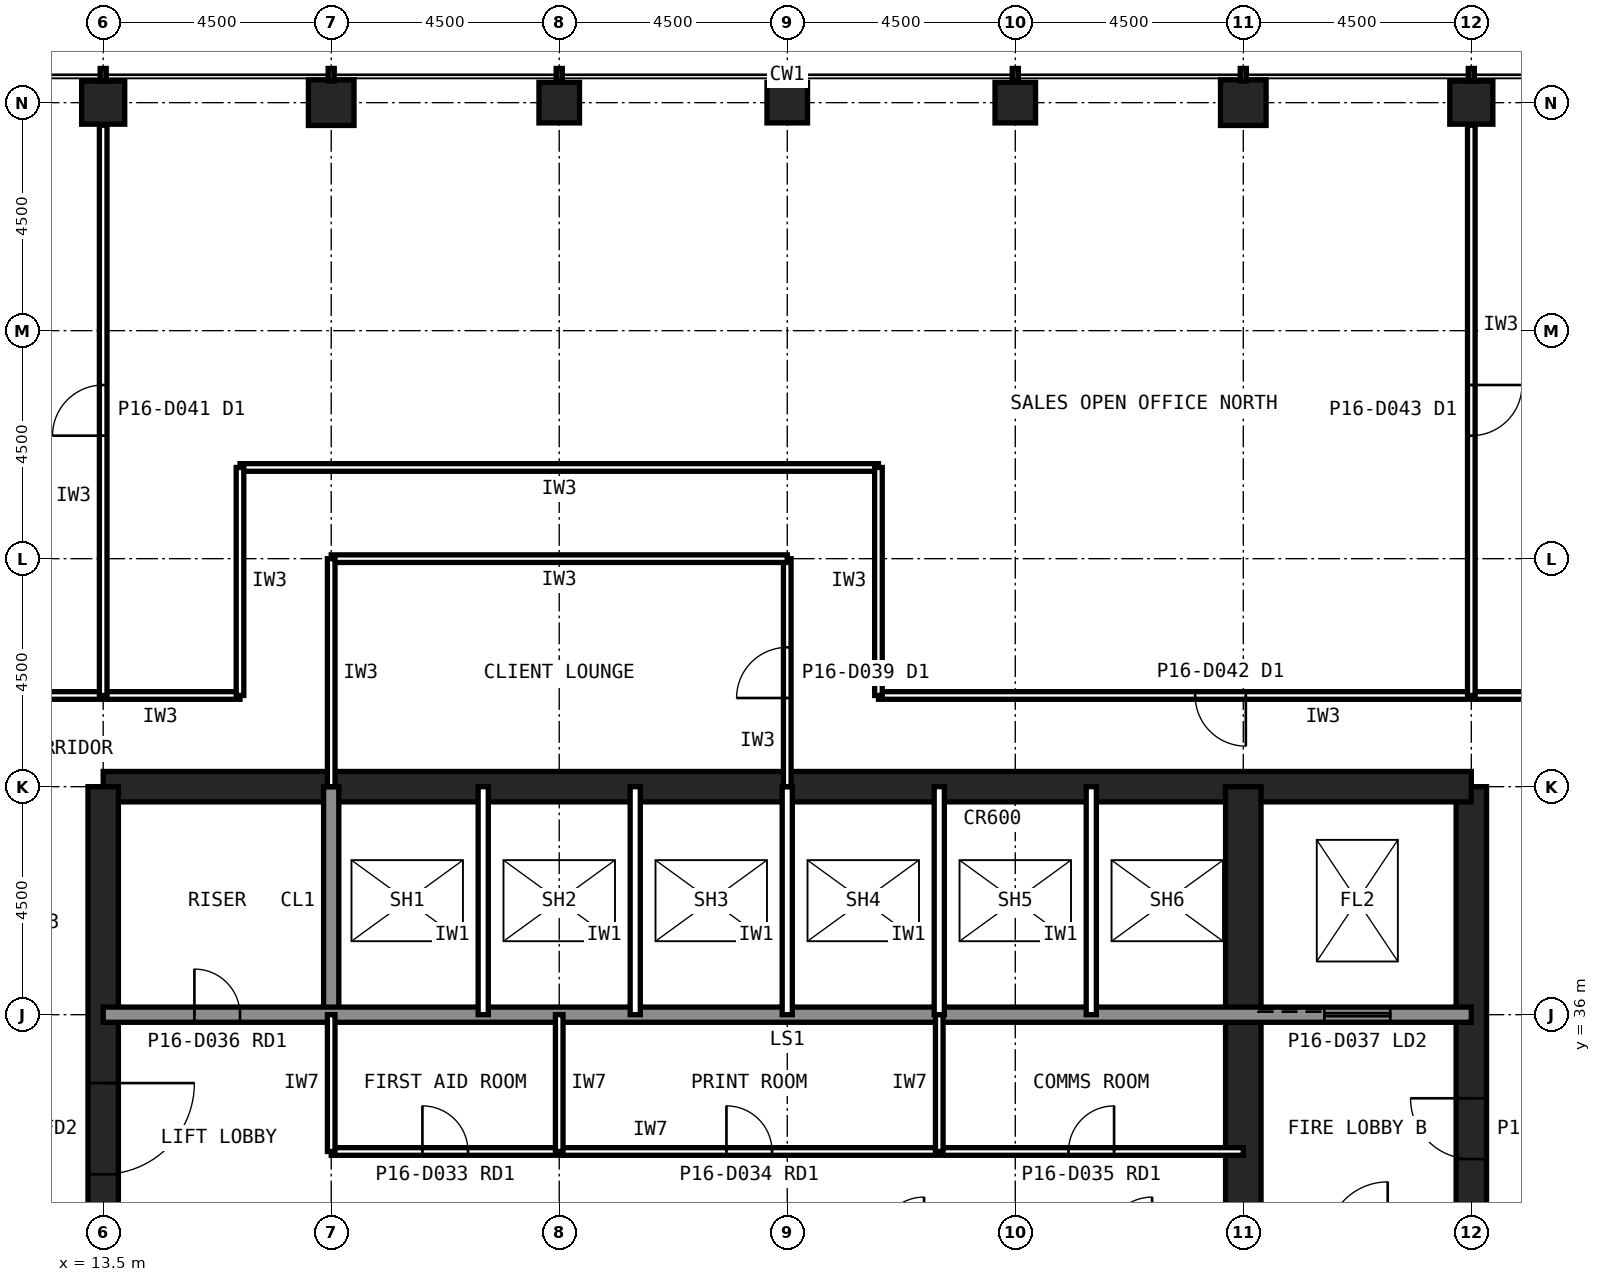
"""IFC4 building model, lengths in metres.
Left out: names, types, materials, properties, quantities, classifications, styles, units other than length and angle.
Written with IfcOpenShell. Run it as: python <this file> out.ifc"""

import sys

from ifc_helpers import new_model, si_unit, direction, frame, frame_2d, origin, origin_2d, place, context, subcontext, project, spatial, rectangle, hollow_rectangle, extrude, element, fill, save


model = new_model("IFC4")
c1 = context("Model", 3, precision=1e-05, world=origin(), true_north=direction((0.0, 1.0)))
c2 = subcontext(c1, "Body", "Model", "MODEL_VIEW")
j1 = project(units=[si_unit("LENGTHUNIT", "METRE"), si_unit("PLANEANGLEUNIT", "RADIAN")], contexts=[c1])
p1 = place(None, origin())
s1 = spatial("IfcSite", under=j1, at=p1, CompositionType="ELEMENT")
p2 = place(p1, origin())
s2 = spatial("IfcBuilding", under=s1, at=p2, CompositionType="ELEMENT")
p3 = place(p2, frame((0.0, 0.0, 71.0)))
s3 = spatial("IfcBuildingStorey", under=s2, at=p3, CompositionType="ELEMENT", Elevation=71.0)
p4 = place(p3, frame((40.5, 54.0, 0.0), z_axis=(0.0, 0.0, 1.0), x_axis=(1.0, 0.0, 0.0)))
e1 = element("IfcColumn", 1, at=p4, inside=s3, PredefinedType="COLUMN", context=c2, shape_type="SweptSolid", body=[
    extrude(hollow_rectangle(XDim=0.85, YDim=0.85, WallThickness=0.05, at=origin_2d()), origin(), (0.0, 0.0, 1.0), 4.2),
])
p5 = place(p3, frame((36.0, 54.0, 0.0), z_axis=(0.0, 0.0, 1.0), x_axis=(1.0, 0.0, 0.0)))
e2 = element("IfcColumn", 2, at=p5, inside=s3, PredefinedType="COLUMN", context=c2, shape_type="SweptSolid", body=[
    extrude(hollow_rectangle(XDim=0.9, YDim=0.9, WallThickness=0.063, at=origin_2d()), origin(), (0.0, 0.0, 1.0), 4.2),
])
for number, where, z_axis, x_axis in (
    (3, (31.5, 54.0, 0.0), (0.0, 0.0, 1.0), (1.0, 0.0, 0.0)),
    (4, (27.0, 54.0, 0.0), (0.0, 0.0, 1.0), (1.0, 0.0, 0.0)),
    (5, (22.5, 54.0, 0.0), (0.0, 0.0, 1.0), (1.0, 0.0, 0.0)),
):
    element("IfcColumn", number, at=place(p3, frame(where, z_axis=z_axis, x_axis=x_axis)), inside=s3, PredefinedType="COLUMN", context=c2, shape_type="SweptSolid", body=[
        extrude(hollow_rectangle(XDim=0.8, YDim=0.8, WallThickness=0.045, at=origin_2d()), origin(), (0.0, 0.0, 1.0), 4.2),
    ])
p6 = place(p3, frame((18.0, 54.0, 0.0), z_axis=(0.0, 0.0, 1.0), x_axis=(1.0, 0.0, 0.0)))
e6 = element("IfcColumn", 6, at=p6, inside=s3, PredefinedType="COLUMN", context=c2, shape_type="SweptSolid", body=[
    extrude(hollow_rectangle(XDim=0.9, YDim=0.9, WallThickness=0.063, at=origin_2d()), origin(), (0.0, 0.0, 1.0), 4.2),
])
p7 = place(p3, frame((13.5, 54.0, 0.0), z_axis=(0.0, 0.0, 1.0), x_axis=(1.0, 0.0, 0.0)))
e7 = element("IfcColumn", 7, at=p7, inside=s3, PredefinedType="COLUMN", context=c2, shape_type="SweptSolid", body=[
    extrude(hollow_rectangle(XDim=0.85, YDim=0.85, WallThickness=0.05, at=origin_2d()), origin(), (0.0, 0.0, 1.0), 4.2),
])
p8 = place(p3, frame((40.5, 13.5, 0.0), z_axis=(0.0, 0.0, 1.0), x_axis=(0.0, 1.0, 0.0)))
e8 = element("IfcWall", 8, at=p8, inside=s3, PredefinedType="SHEAR", context=c2, shape_type="SweptSolid", body=[
    extrude(rectangle(XDim=27.0, YDim=0.6, at=frame_2d((13.5, 0.0))), origin(), (0.0, 0.0, 1.0), 4.2),
])
p9 = place(p8, frame((5.85, 0.0, 0.0)))
e9 = element("IfcOpeningElement", 9, at=p9, cuts=e8, PredefinedType="OPENING", context=c2, shape_type="SweptSolid", body=[
    extrude(rectangle(XDim=1.8, YDim=2.1, at=frame_2d((0.9, 1.05))), frame((0.0, 0.31, 0.0), z_axis=(0.0, -1.0, 0.0), x_axis=(1.0, 0.0, 0.0)), (0.0, 0.0, 1.0), 0.62),
])
p10 = place(p8, frame((19.65, 0.0, 0.0)))
e10 = element("IfcOpeningElement", 10, at=p10, cuts=e8, PredefinedType="OPENING", context=c2, shape_type="SweptSolid", body=[
    extrude(rectangle(XDim=1.2, YDim=2.1, at=frame_2d((0.6, 1.05))), frame((0.0, 0.31, 0.0), z_axis=(0.0, -1.0, 0.0), x_axis=(1.0, 0.0, 0.0)), (0.0, 0.0, 1.0), 0.62),
])
p11 = place(p3, frame((40.5, 40.5, 0.0), z_axis=(0.0, 0.0, 1.0), x_axis=(-1.0, 0.0, 0.0)))
e11 = element("IfcWall", 11, at=p11, inside=s3, PredefinedType="SHEAR", context=c2, shape_type="SweptSolid", body=[
    extrude(rectangle(XDim=27.0, YDim=0.6, at=frame_2d((13.5, 0.0))), origin(), (0.0, 0.0, 1.0), 4.2),
])
p12 = place(p3, frame((13.5, 40.5, 0.0), z_axis=(0.0, 0.0, 1.0), x_axis=(0.0, -1.0, 0.0)))
e12 = element("IfcWall", 12, at=p12, inside=s3, PredefinedType="SHEAR", context=c2, shape_type="SweptSolid", body=[
    extrude(rectangle(XDim=27.0, YDim=0.6, at=frame_2d((13.5, 0.0))), origin(), (0.0, 0.0, 1.0), 4.2),
])
p13 = place(p12, frame((19.65, 0.0, 0.0)))
e13 = element("IfcOpeningElement", 13, at=p13, cuts=e12, PredefinedType="OPENING", context=c2, shape_type="SweptSolid", body=[
    extrude(rectangle(XDim=1.2, YDim=2.1, at=frame_2d((0.6, 1.05))), frame((0.0, 0.31, 0.0), z_axis=(0.0, -1.0, 0.0), x_axis=(1.0, 0.0, 0.0)), (0.0, 0.0, 1.0), 0.62),
])
p14 = place(p12, frame((5.85, 0.0, 0.0)))
e14 = element("IfcOpeningElement", 14, at=p14, cuts=e12, PredefinedType="OPENING", context=c2, shape_type="SweptSolid", body=[
    extrude(rectangle(XDim=1.8, YDim=2.1, at=frame_2d((0.9, 1.05))), frame((0.0, 0.31, 0.0), z_axis=(0.0, -1.0, 0.0), x_axis=(1.0, 0.0, 0.0)), (0.0, 0.0, 1.0), 0.62),
])
p15 = place(p3, frame((18.0, 36.0, 0.0), z_axis=(0.0, 0.0, 1.0), x_axis=(0.0, 1.0, 0.0)))
e15 = element("IfcWall", 15, at=p15, inside=s3, PredefinedType="SOLIDWALL", context=c2, shape_type="SweptSolid", body=[
    extrude(rectangle(XDim=4.5, YDim=0.3, at=frame_2d((2.25, 0.0))), origin(), (0.0, 0.0, 1.0), 4.04),
])
p16 = place(p3, frame((36.0, 22.5, 0.0), z_axis=(0.0, 0.0, 1.0), x_axis=(0.0, 1.0, 0.0)))
e16 = element("IfcWall", 16, at=p16, inside=s3, PredefinedType="SHEAR", context=c2, shape_type="SweptSolid", body=[
    extrude(rectangle(XDim=18.0, YDim=0.7, at=frame_2d((9.0, 0.0))), origin(), (0.0, 0.0, 1.0), 4.2),
])
p17 = place(p3, frame((13.5, 36.0, 0.0), z_axis=(0.0, 0.0, 1.0), x_axis=(1.0, 0.0, 0.0)))
e17 = element("IfcWall", 17, at=p17, inside=s3, PredefinedType="SOLIDWALL", context=c2, shape_type="SweptSolid", body=[
    extrude(rectangle(XDim=27.0, YDim=0.3, at=frame_2d((13.5, 0.0))), origin(), (0.0, 0.0, 1.0), 4.04),
])
p18 = place(p17, frame((1.8, 0.0, 0.0)))
e18 = element("IfcOpeningElement", 18, at=p18, cuts=e17, PredefinedType="OPENING", context=c2, shape_type="SweptSolid", body=[
    extrude(rectangle(XDim=0.9, YDim=2.1, at=frame_2d((0.45, 1.05))), frame((0.0, 0.16, 0.0), z_axis=(0.0, -1.0, 0.0), x_axis=(1.0, 0.0, 0.0)), (0.0, 0.0, 1.0), 0.32),
])
p19 = place(p17, frame((24.1, 0.0, 0.0)))
e19 = element("IfcOpeningElement", 19, at=p19, cuts=e17, PredefinedType="OPENING", context=c2, shape_type="SweptSolid", body=[
    extrude(rectangle(XDim=1.3, YDim=2.2, at=frame_2d((0.65, 1.1))), frame((0.0, 0.16, 0.0), z_axis=(0.0, -1.0, 0.0), x_axis=(1.0, 0.0, 0.0)), (0.0, 0.0, 1.0), 0.32),
])
for number, where, z_axis, x_axis in (
    (20, (21.0, 36.0, 0.0), (0.0, 0.0, 1.0), (0.0, 1.0, 0.0)),
    (21, (24.0, 36.0, 0.0), (0.0, 0.0, 1.0), (0.0, 1.0, 0.0)),
    (22, (27.0, 36.0, 0.0), (0.0, 0.0, 1.0), (0.0, 1.0, 0.0)),
    (23, (30.0, 36.0, 0.0), (0.0, 0.0, 1.0), (0.0, 1.0, 0.0)),
    (24, (33.0, 36.0, 0.0), (0.0, 0.0, 1.0), (0.0, 1.0, 0.0)),
):
    element("IfcWall", number, at=place(p3, frame(where, z_axis=z_axis, x_axis=x_axis)), inside=s3, PredefinedType="PARTITIONING", context=c2, shape_type="SweptSolid", body=[
        extrude(rectangle(XDim=4.5, YDim=0.2, at=frame_2d((2.25, 0.0))), origin(), (0.0, 0.0, 1.0), 4.04),
    ])
p20 = place(p3, frame((18.0, 33.3, 0.0), z_axis=(0.0, 0.0, 1.0), x_axis=(1.0, 0.0, 0.0)))
e25 = element("IfcWall", 25, at=p20, inside=s3, PredefinedType="PARTITIONING", context=c2, shape_type="SweptSolid", body=[
    extrude(rectangle(XDim=18.0, YDim=0.15, at=frame_2d((9.0, 0.0))), origin(), (0.0, 0.0, 1.0), 4.04),
])
p21 = place(p20, frame((1.8, 0.0, 0.0)))
e26 = element("IfcOpeningElement", 26, at=p21, cuts=e25, PredefinedType="OPENING", context=c2, shape_type="SweptSolid", body=[
    extrude(rectangle(XDim=0.9, YDim=2.1, at=frame_2d((0.45, 1.05))), frame((0.0, 0.085, 0.0), z_axis=(0.0, -1.0, 0.0), x_axis=(1.0, 0.0, 0.0)), (0.0, 0.0, 1.0), 0.17),
])
p22 = place(p20, frame((7.8, 0.0, 0.0)))
e27 = element("IfcOpeningElement", 27, at=p22, cuts=e25, PredefinedType="OPENING", context=c2, shape_type="SweptSolid", body=[
    extrude(rectangle(XDim=0.9, YDim=2.1, at=frame_2d((0.45, 1.05))), frame((0.0, 0.085, 0.0), z_axis=(0.0, -1.0, 0.0), x_axis=(1.0, 0.0, 0.0)), (0.0, 0.0, 1.0), 0.17),
])
p23 = place(p20, frame((14.55, 0.0, 0.0)))
e28 = element("IfcOpeningElement", 28, at=p23, cuts=e25, PredefinedType="OPENING", context=c2, shape_type="SweptSolid", body=[
    extrude(rectangle(XDim=0.9, YDim=2.1, at=frame_2d((0.45, 1.05))), frame((0.0, 0.085, 0.0), z_axis=(0.0, -1.0, 0.0), x_axis=(1.0, 0.0, 0.0)), (0.0, 0.0, 1.0), 0.17),
])
for number, where, z_axis, x_axis in (
    (29, (18.0, 33.3, 0.0), (0.0, 0.0, 1.0), (0.0, 1.0, 0.0)),
    (30, (22.5, 33.3, 0.0), (0.0, 0.0, 1.0), (0.0, 1.0, 0.0)),
    (31, (30.0, 33.3, 0.0), (0.0, 0.0, 1.0), (0.0, 1.0, 0.0)),
):
    element("IfcWall", number, at=place(p3, frame(where, z_axis=z_axis, x_axis=x_axis)), inside=s3, PredefinedType="PARTITIONING", context=c2, shape_type="SweptSolid", body=[
        extrude(rectangle(XDim=2.7, YDim=0.15, at=frame_2d((1.35, 0.0))), origin(), (0.0, 0.0, 1.0), 4.04),
    ])
p24 = place(p3, frame((42.3, 42.3, 0.0), z_axis=(0.0, 0.0, 1.0), x_axis=(-1.0, 0.0, 0.0)))
e32 = element("IfcWall", 32, at=p24, inside=s3, PredefinedType="PARTITIONING", context=c2, shape_type="SweptSolid", body=[
    extrude(rectangle(XDim=13.5, YDim=0.15, at=frame_2d((6.75, 0.0))), origin(), (0.0, 0.0, 1.0), 4.04),
])
p25 = place(p24, frame((6.25, 0.0, 0.0)))
e33 = element("IfcOpeningElement", 33, at=p25, cuts=e32, PredefinedType="OPENING", context=c2, shape_type="SweptSolid", body=[
    extrude(rectangle(XDim=1.0, YDim=2.1, at=frame_2d((0.5, 1.05))), frame((0.0, 0.085, 0.0), z_axis=(0.0, -1.0, 0.0), x_axis=(1.0, 0.0, 0.0)), (0.0, 0.0, 1.0), 0.17),
])
p26 = place(p3, frame((28.8, 46.8, 0.0), z_axis=(0.0, 0.0, 1.0), x_axis=(-1.0, 0.0, 0.0)))
e34 = element("IfcWall", 34, at=p26, inside=s3, PredefinedType="PARTITIONING", context=c2, shape_type="SweptSolid", body=[
    extrude(rectangle(XDim=12.6, YDim=0.15, at=frame_2d((6.3, 0.0))), origin(), (0.0, 0.0, 1.0), 4.04),
])
for number, where, z_axis, x_axis in (
    (35, (16.2, 42.3, 0.0), (0.0, 0.0, 1.0), (-1.0, 0.0, 0.0)),
    (36, (16.2, 46.8, 0.0), (0.0, 0.0, 1.0), (0.0, -1.0, 0.0)),
    (37, (28.8, 42.3, 0.0), (0.0, 0.0, 1.0), (0.0, 1.0, 0.0)),
):
    element("IfcWall", number, at=place(p3, frame(where, z_axis=z_axis, x_axis=x_axis)), inside=s3, PredefinedType="PARTITIONING", context=c2, shape_type="SweptSolid", body=[
        extrude(rectangle(XDim=4.5, YDim=0.15, at=frame_2d((2.25, 0.0))), origin(), (0.0, 0.0, 1.0), 4.04),
    ])
p27 = place(p3, frame((27.0, 40.5, 0.0), z_axis=(0.0, 0.0, 1.0), x_axis=(0.0, 1.0, 0.0)))
e38 = element("IfcWall", 38, at=p27, inside=s3, PredefinedType="PARTITIONING", context=c2, shape_type="SweptSolid", body=[
    extrude(rectangle(XDim=4.5, YDim=0.15, at=frame_2d((2.25, 0.0))), origin(), (0.0, 0.0, 1.0), 3.189),
])
p28 = place(p27, frame((1.75, 0.0, 0.0)))
e39 = element("IfcOpeningElement", 39, at=p28, cuts=e38, PredefinedType="OPENING", context=c2, shape_type="SweptSolid", body=[
    extrude(rectangle(XDim=1.0, YDim=2.1, at=frame_2d((0.5, 1.05))), frame((0.0, 0.085, 0.0), z_axis=(0.0, -1.0, 0.0), x_axis=(1.0, 0.0, 0.0)), (0.0, 0.0, 1.0), 0.17),
])
p29 = place(p3, frame((27.0, 45.0, 0.0), z_axis=(0.0, 0.0, 1.0), x_axis=(-1.0, 0.0, 0.0)))
e40 = element("IfcWall", 40, at=p29, inside=s3, PredefinedType="PARTITIONING", context=c2, shape_type="SweptSolid", body=[
    extrude(rectangle(XDim=9.0, YDim=0.15, at=frame_2d((4.5, 0.0))), origin(), (0.0, 0.0, 1.0), 4.04),
])
p30 = place(p3, frame((18.0, 45.0, 0.0), z_axis=(0.0, 0.0, 1.0), x_axis=(0.0, -1.0, 0.0)))
e41 = element("IfcWall", 41, at=p30, inside=s3, PredefinedType="PARTITIONING", context=c2, shape_type="SweptSolid", body=[
    extrude(rectangle(XDim=4.5, YDim=0.15, at=frame_2d((2.25, 0.0))), origin(), (0.0, 0.0, 1.0), 3.189),
])
p31 = place(p3, frame((40.5, 53.555, 0.0), z_axis=(0.0, 0.0, 1.0), x_axis=(0.0, -1.0, 0.0)))
e42 = element("IfcWall", 42, at=p31, inside=s3, PredefinedType="PARTITIONING", context=c2, shape_type="SweptSolid", body=[
    extrude(rectangle(XDim=11.255, YDim=0.15, at=frame_2d((5.627, 0.0))), origin(), (0.0, 0.0, 1.0), 3.189),
])
p32 = place(p31, frame((5.127, 0.0, 0.0)))
e43 = element("IfcOpeningElement", 43, at=p32, cuts=e42, PredefinedType="OPENING", context=c2, shape_type="SweptSolid", body=[
    extrude(rectangle(XDim=1.0, YDim=2.1, at=frame_2d((0.5, 1.05))), frame((0.0, 0.085, 0.0), z_axis=(0.0, -1.0, 0.0), x_axis=(1.0, 0.0, 0.0)), (0.0, 0.0, 1.0), 0.17),
])
p33 = place(p3, frame((13.5, 42.3, 0.0), z_axis=(0.0, 0.0, 1.0), x_axis=(0.0, 1.0, 0.0)))
e44 = element("IfcWall", 44, at=p33, inside=s3, PredefinedType="PARTITIONING", context=c2, shape_type="SweptSolid", body=[
    extrude(rectangle(XDim=11.255, YDim=0.15, at=frame_2d((5.627, 0.0))), origin(), (0.0, 0.0, 1.0), 3.189),
])
p34 = place(p33, frame((5.127, 0.0, 0.0)))
e45 = element("IfcOpeningElement", 45, at=p34, cuts=e44, PredefinedType="OPENING", context=c2, shape_type="SweptSolid", body=[
    extrude(rectangle(XDim=1.0, YDim=2.1, at=frame_2d((0.5, 1.05))), frame((0.0, 0.085, 0.0), z_axis=(0.0, -1.0, 0.0), x_axis=(1.0, 0.0, 0.0)), (0.0, 0.0, 1.0), 0.17),
])
p35 = place(p14, origin())
e46 = element("IfcDoor", 46, at=p35, inside=s3, OperationType="SINGLE_SWING_LEFT", PredefinedType="DOOR", context=c2, shape_type="SweptSolid", body=[
    extrude(rectangle(XDim=1.8, YDim=2.1, at=frame_2d((0.9, 1.05))), frame((0.0, 0.025, 0.0), z_axis=(0.0, -1.0, 0.0), x_axis=(1.0, 0.0, 0.0)), (0.0, 0.0, 1.0), 0.05),
])
fill(e14, e46)
p36 = place(p10, origin())
e47 = element("IfcDoor", 47, at=p36, inside=s3, OperationType="SINGLE_SWING_RIGHT", PredefinedType="DOOR", context=c2, shape_type="SweptSolid", body=[
    extrude(rectangle(XDim=1.2, YDim=2.1, at=frame_2d((0.6, 1.05))), frame((0.0, 0.025, 0.0), z_axis=(0.0, -1.0, 0.0), x_axis=(1.0, 0.0, 0.0)), (0.0, 0.0, 1.0), 0.05),
])
fill(e10, e47)
p37 = place(p18, origin())
e48 = element("IfcDoor", 48, at=p37, inside=s3, OperationType="SINGLE_SWING_LEFT", PredefinedType="DOOR", context=c2, shape_type="SweptSolid", body=[
    extrude(rectangle(XDim=0.9, YDim=2.1, at=frame_2d((0.45, 1.05))), frame((0.0, 0.025, 0.0), z_axis=(0.0, -1.0, 0.0), x_axis=(1.0, 0.0, 0.0)), (0.0, 0.0, 1.0), 0.05),
])
fill(e18, e48)
p38 = place(p21, origin())
e49 = element("IfcDoor", 49, at=p38, inside=s3, OperationType="SINGLE_SWING_LEFT", PredefinedType="DOOR", context=c2, shape_type="SweptSolid", body=[
    extrude(rectangle(XDim=0.9, YDim=2.1, at=frame_2d((0.45, 1.05))), frame((0.0, 0.025, 0.0), z_axis=(0.0, -1.0, 0.0), x_axis=(1.0, 0.0, 0.0)), (0.0, 0.0, 1.0), 0.05),
])
fill(e26, e49)
p39 = place(p22, origin())
e50 = element("IfcDoor", 50, at=p39, inside=s3, OperationType="SINGLE_SWING_LEFT", PredefinedType="DOOR", context=c2, shape_type="SweptSolid", body=[
    extrude(rectangle(XDim=0.9, YDim=2.1, at=frame_2d((0.45, 1.05))), frame((0.0, 0.025, 0.0), z_axis=(0.0, -1.0, 0.0), x_axis=(1.0, 0.0, 0.0)), (0.0, 0.0, 1.0), 0.05),
])
fill(e27, e50)
p40 = place(p23, origin())
e51 = element("IfcDoor", 51, at=p40, inside=s3, OperationType="SINGLE_SWING_RIGHT", PredefinedType="DOOR", context=c2, shape_type="SweptSolid", body=[
    extrude(rectangle(XDim=0.9, YDim=2.1, at=frame_2d((0.45, 1.05))), frame((0.0, 0.025, 0.0), z_axis=(0.0, -1.0, 0.0), x_axis=(1.0, 0.0, 0.0)), (0.0, 0.0, 1.0), 0.05),
])
fill(e28, e51)
p41 = place(p19, origin())
e52 = element("IfcDoor", 52, at=p41, inside=s3, OperationType="SLIDING_TO_LEFT", PredefinedType="DOOR", context=c2, shape_type="SweptSolid", body=[
    extrude(rectangle(XDim=1.3, YDim=2.2, at=frame_2d((0.65, 1.1))), frame((0.0, 0.025, 0.0), z_axis=(0.0, -1.0, 0.0), x_axis=(1.0, 0.0, 0.0)), (0.0, 0.0, 1.0), 0.05),
])
fill(e19, e52)
p42 = place(p25, origin())
e53 = element("IfcDoor", 53, at=p42, inside=s3, OperationType="SINGLE_SWING_LEFT", PredefinedType="DOOR", context=c2, shape_type="SweptSolid", body=[
    extrude(rectangle(XDim=1.0, YDim=2.1, at=frame_2d((0.5, 1.05))), frame((0.0, 0.025, 0.0), z_axis=(0.0, -1.0, 0.0), x_axis=(1.0, 0.0, 0.0)), (0.0, 0.0, 1.0), 0.05),
])
fill(e33, e53)
p43 = place(p28, origin())
e54 = element("IfcDoor", 54, at=p43, inside=s3, OperationType="SINGLE_SWING_LEFT", PredefinedType="DOOR", context=c2, shape_type="SweptSolid", body=[
    extrude(rectangle(XDim=1.0, YDim=2.1, at=frame_2d((0.5, 1.05))), frame((0.0, 0.025, 0.0), z_axis=(0.0, -1.0, 0.0), x_axis=(1.0, 0.0, 0.0)), (0.0, 0.0, 1.0), 0.05),
])
fill(e39, e54)
p44 = place(p32, origin())
e55 = element("IfcDoor", 55, at=p44, inside=s3, OperationType="SINGLE_SWING_LEFT", PredefinedType="DOOR", context=c2, shape_type="SweptSolid", body=[
    extrude(rectangle(XDim=1.0, YDim=2.1, at=frame_2d((0.5, 1.05))), frame((0.0, 0.025, 0.0), z_axis=(0.0, -1.0, 0.0), x_axis=(1.0, 0.0, 0.0)), (0.0, 0.0, 1.0), 0.05),
])
fill(e43, e55)
p45 = place(p34, origin())
e56 = element("IfcDoor", 56, at=p45, inside=s3, OperationType="SINGLE_SWING_LEFT", PredefinedType="DOOR", context=c2, shape_type="SweptSolid", body=[
    extrude(rectangle(XDim=1.0, YDim=2.1, at=frame_2d((0.5, 1.05))), frame((0.0, 0.025, 0.0), z_axis=(0.0, -1.0, 0.0), x_axis=(1.0, 0.0, 0.0)), (0.0, 0.0, 1.0), 0.05),
])
fill(e45, e56)
save(model, sys.argv[1])
